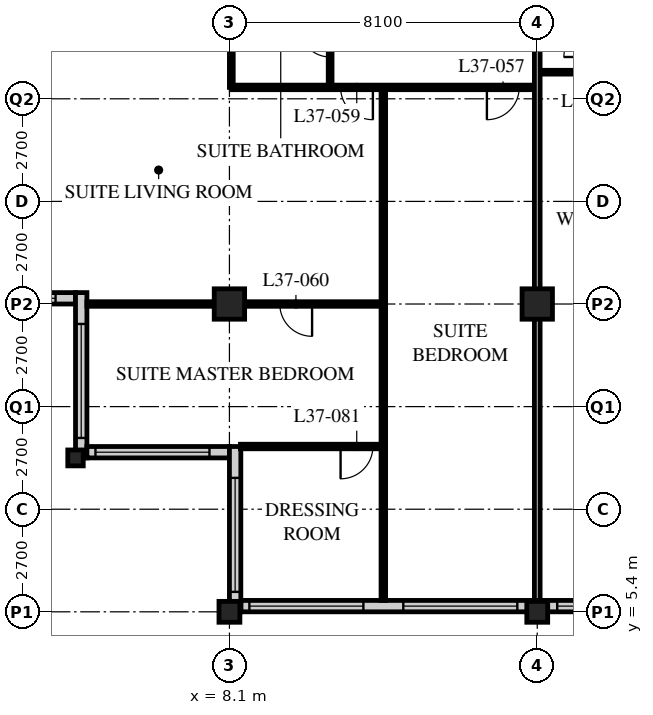
"""IFC4 building model, lengths in metres.
Left out: names, types, materials, properties, quantities, classifications, styles, units other than length and angle.
Written with IfcOpenShell. Run it as: python <this file> out.ifc"""

import sys

from ifc_helpers import new_model, si_unit, direction, frame, frame_2d, origin, origin_2d, place, context, subcontext, project, spatial, rectangle, hollow_rectangle, i_section, extrude, element, fill, save


model = new_model("IFC4")
c1 = context("Model", 3, precision=1e-05, world=origin(), true_north=direction((0.0, 1.0)))
c2 = subcontext(c1, "Body", "Model", "MODEL_VIEW")
j1 = project(units=[si_unit("LENGTHUNIT", "METRE"), si_unit("PLANEANGLEUNIT", "RADIAN")], contexts=[c1])
p1 = place(None, origin())
s1 = spatial("IfcSite", under=j1, at=p1, CompositionType="ELEMENT")
p2 = place(p1, origin())
s2 = spatial("IfcBuilding", under=s1, at=p2, CompositionType="ELEMENT")
p3 = place(p2, frame((0.0, 0.0, 144.2)))
s3 = spatial("IfcBuildingStorey", under=s2, at=p3, CompositionType="ELEMENT", Elevation=144.2)
p4 = place(p3, frame((4.05, 9.45, 0.0), z_axis=(0.0, 0.0, 1.0), x_axis=(1.0, 0.0, 0.0)))
e1 = element("IfcColumn", 1, at=p4, inside=s3, PredefinedType="COLUMN", context=c2, shape_type="SweptSolid", body=[
    extrude(i_section(OverallWidth=0.407, OverallDepth=0.419, WebThickness=0.031, FlangeThickness=0.049, FilletRadius=0.015, at=origin_2d()), origin(), (0.0, 0.0, 1.0), 3.4),
])
p5 = place(p3, frame((8.1, 5.4, 0.0), z_axis=(0.0, 0.0, 1.0), x_axis=(1.0, 0.0, 0.0)))
e2 = element("IfcColumn", 2, at=p5, inside=s3, PredefinedType="COLUMN", context=c2, shape_type="SweptSolid", body=[
    extrude(hollow_rectangle(XDim=0.55, YDim=0.55, WallThickness=0.04, at=origin_2d()), origin(), (0.0, 0.0, 1.0), 3.4),
])
p6 = place(p3, frame((8.1, 13.5, 0.0), z_axis=(0.0, 0.0, 1.0), x_axis=(1.0, 0.0, 0.0)))
e3 = element("IfcColumn", 3, at=p6, inside=s3, PredefinedType="COLUMN", context=c2, shape_type="SweptSolid", body=[
    extrude(hollow_rectangle(XDim=0.8, YDim=0.8, WallThickness=0.08, at=origin_2d()), origin(), (0.0, 0.0, 1.0), 3.4),
])
p7 = place(p3, frame((16.2, 5.4, 0.0), z_axis=(0.0, 0.0, 1.0), x_axis=(1.0, 0.0, 0.0)))
e4 = element("IfcColumn", 4, at=p7, inside=s3, PredefinedType="COLUMN", context=c2, shape_type="SweptSolid", body=[
    extrude(hollow_rectangle(XDim=0.55, YDim=0.55, WallThickness=0.04, at=origin_2d()), origin(), (0.0, 0.0, 1.0), 3.4),
])
p8 = place(p3, frame((16.2, 13.5, 0.0), z_axis=(0.0, 0.0, 1.0), x_axis=(1.0, 0.0, 0.0)))
e5 = element("IfcColumn", 5, at=p8, inside=s3, PredefinedType="COLUMN", context=c2, shape_type="SweptSolid", body=[
    extrude(hollow_rectangle(XDim=0.8, YDim=0.8, WallThickness=0.08, at=origin_2d()), origin(), (0.0, 0.0, 1.0), 3.4),
])
p9 = place(p3, frame((8.4, 5.55, 0.0), z_axis=(0.0, 0.0, 1.0), x_axis=(1.0, 0.0, 0.0)))
e6 = element("IfcWall", 6, at=p9, inside=s3, PredefinedType="SOLIDWALL", context=c2, shape_type="SweptSolid", body=[
    extrude(rectangle(XDim=40.2, YDim=0.3, at=frame_2d((20.1, 0.0))), origin(), (0.0, 0.0, 1.0), 3.19),
])
p10 = place(p9, frame((0.225, 0.0, 0.9)))
e7 = element("IfcOpeningElement", 7, at=p10, cuts=e6, PredefinedType="OPENING", context=c2, shape_type="SweptSolid", body=[
    extrude(rectangle(XDim=3.0, YDim=1.4, at=frame_2d((1.5, 0.7))), frame((0.0, 0.16, 0.0), z_axis=(0.0, -1.0, 0.0), x_axis=(1.0, 0.0, 0.0)), (0.0, 0.0, 1.0), 0.32),
])
p11 = place(p9, frame((4.275, 0.0, 0.9)))
e8 = element("IfcOpeningElement", 8, at=p11, cuts=e6, PredefinedType="OPENING", context=c2, shape_type="SweptSolid", body=[
    extrude(rectangle(XDim=3.0, YDim=1.4, at=frame_2d((1.5, 0.7))), frame((0.0, 0.16, 0.0), z_axis=(0.0, -1.0, 0.0), x_axis=(1.0, 0.0, 0.0)), (0.0, 0.0, 1.0), 0.32),
])
p12 = place(p9, frame((8.325, 0.0, 0.9)))
e9 = element("IfcOpeningElement", 9, at=p12, cuts=e6, PredefinedType="OPENING", context=c2, shape_type="SweptSolid", body=[
    extrude(rectangle(XDim=3.0, YDim=1.4, at=frame_2d((1.5, 0.7))), frame((0.0, 0.16, 0.0), z_axis=(0.0, -1.0, 0.0), x_axis=(1.0, 0.0, 0.0)), (0.0, 0.0, 1.0), 0.32),
])
p13 = place(p9, frame((12.375, 0.0, 0.9)))
e10 = element("IfcOpeningElement", 10, at=p13, cuts=e6, PredefinedType="OPENING", context=c2, shape_type="SweptSolid", body=[
    extrude(rectangle(XDim=3.0, YDim=1.4, at=frame_2d((1.5, 0.7))), frame((0.0, 0.16, 0.0), z_axis=(0.0, -1.0, 0.0), x_axis=(1.0, 0.0, 0.0)), (0.0, 0.0, 1.0), 0.32),
])
p14 = place(p9, frame((16.425, 0.0, 0.9)))
e11 = element("IfcOpeningElement", 11, at=p14, cuts=e6, PredefinedType="OPENING", context=c2, shape_type="SweptSolid", body=[
    extrude(rectangle(XDim=3.0, YDim=1.4, at=frame_2d((1.5, 0.7))), frame((0.0, 0.16, 0.0), z_axis=(0.0, -1.0, 0.0), x_axis=(1.0, 0.0, 0.0)), (0.0, 0.0, 1.0), 0.32),
])
p15 = place(p9, frame((20.475, 0.0, 0.9)))
e12 = element("IfcOpeningElement", 12, at=p15, cuts=e6, PredefinedType="OPENING", context=c2, shape_type="SweptSolid", body=[
    extrude(rectangle(XDim=3.0, YDim=1.4, at=frame_2d((1.5, 0.7))), frame((0.0, 0.16, 0.0), z_axis=(0.0, -1.0, 0.0), x_axis=(1.0, 0.0, 0.0)), (0.0, 0.0, 1.0), 0.32),
])
p16 = place(p9, frame((24.525, 0.0, 0.9)))
e13 = element("IfcOpeningElement", 13, at=p16, cuts=e6, PredefinedType="OPENING", context=c2, shape_type="SweptSolid", body=[
    extrude(rectangle(XDim=3.0, YDim=1.4, at=frame_2d((1.5, 0.7))), frame((0.0, 0.16, 0.0), z_axis=(0.0, -1.0, 0.0), x_axis=(1.0, 0.0, 0.0)), (0.0, 0.0, 1.0), 0.32),
])
p17 = place(p9, frame((28.575, 0.0, 0.9)))
e14 = element("IfcOpeningElement", 14, at=p17, cuts=e6, PredefinedType="OPENING", context=c2, shape_type="SweptSolid", body=[
    extrude(rectangle(XDim=3.0, YDim=1.4, at=frame_2d((1.5, 0.7))), frame((0.0, 0.16, 0.0), z_axis=(0.0, -1.0, 0.0), x_axis=(1.0, 0.0, 0.0)), (0.0, 0.0, 1.0), 0.32),
])
p18 = place(p9, frame((32.625, 0.0, 0.9)))
e15 = element("IfcOpeningElement", 15, at=p18, cuts=e6, PredefinedType="OPENING", context=c2, shape_type="SweptSolid", body=[
    extrude(rectangle(XDim=3.0, YDim=1.4, at=frame_2d((1.5, 0.7))), frame((0.0, 0.16, 0.0), z_axis=(0.0, -1.0, 0.0), x_axis=(1.0, 0.0, 0.0)), (0.0, 0.0, 1.0), 0.32),
])
p19 = place(p9, frame((36.675, 0.0, 0.9)))
e16 = element("IfcOpeningElement", 16, at=p19, cuts=e6, PredefinedType="OPENING", context=c2, shape_type="SweptSolid", body=[
    extrude(rectangle(XDim=3.0, YDim=1.4, at=frame_2d((1.5, 0.7))), frame((0.0, 0.16, 0.0), z_axis=(0.0, -1.0, 0.0), x_axis=(1.0, 0.0, 0.0)), (0.0, 0.0, 1.0), 0.32),
])
p20 = place(p3, frame((0.3, 13.65, 0.0), z_axis=(0.0, 0.0, 1.0), x_axis=(1.0, 0.0, 0.0)))
e17 = element("IfcWall", 17, at=p20, inside=s3, PredefinedType="SOLIDWALL", context=c2, shape_type="SweptSolid", body=[
    extrude(rectangle(XDim=3.75, YDim=0.3, at=frame_2d((1.875, 0.0))), origin(), (0.0, 0.0, 1.0), 3.19),
])
p21 = place(p20, frame((0.225, 0.0, 0.9)))
e18 = element("IfcOpeningElement", 18, at=p21, cuts=e17, PredefinedType="OPENING", context=c2, shape_type="SweptSolid", body=[
    extrude(rectangle(XDim=3.0, YDim=1.4, at=frame_2d((1.5, 0.7))), frame((0.0, 0.16, 0.0), z_axis=(0.0, -1.0, 0.0), x_axis=(1.0, 0.0, 0.0)), (0.0, 0.0, 1.0), 0.32),
])
p22 = place(p3, frame((4.2, 13.8, 0.0), z_axis=(0.0, 0.0, 1.0), x_axis=(0.0, -1.0, 0.0)))
e19 = element("IfcWall", 19, at=p22, inside=s3, PredefinedType="SOLIDWALL", context=c2, shape_type="SweptSolid", body=[
    extrude(rectangle(XDim=4.35, YDim=0.3, at=frame_2d((2.175, 0.0))), origin(), (0.0, 0.0, 1.0), 3.19),
])
p23 = place(p22, frame((0.825, 0.0, 0.9)))
e20 = element("IfcOpeningElement", 20, at=p23, cuts=e19, PredefinedType="OPENING", context=c2, shape_type="SweptSolid", body=[
    extrude(rectangle(XDim=3.0, YDim=1.4, at=frame_2d((1.5, 0.7))), frame((0.0, 0.16, 0.0), z_axis=(0.0, -1.0, 0.0), x_axis=(1.0, 0.0, 0.0)), (0.0, 0.0, 1.0), 0.32),
])
p24 = place(p3, frame((4.35, 9.6, 0.0), z_axis=(0.0, 0.0, 1.0), x_axis=(1.0, 0.0, 0.0)))
e21 = element("IfcWall", 21, at=p24, inside=s3, PredefinedType="SOLIDWALL", context=c2, shape_type="SweptSolid", body=[
    extrude(rectangle(XDim=3.75, YDim=0.3, at=frame_2d((1.875, 0.0))), origin(), (0.0, 0.0, 1.0), 3.19),
])
p25 = place(p24, frame((0.225, 0.0, 0.9)))
e22 = element("IfcOpeningElement", 22, at=p25, cuts=e21, PredefinedType="OPENING", context=c2, shape_type="SweptSolid", body=[
    extrude(rectangle(XDim=3.0, YDim=1.4, at=frame_2d((1.5, 0.7))), frame((0.0, 0.16, 0.0), z_axis=(0.0, -1.0, 0.0), x_axis=(1.0, 0.0, 0.0)), (0.0, 0.0, 1.0), 0.32),
])
p26 = place(p3, frame((8.25, 9.75, 0.0), z_axis=(0.0, 0.0, 1.0), x_axis=(0.0, -1.0, 0.0)))
e23 = element("IfcWall", 23, at=p26, inside=s3, PredefinedType="SOLIDWALL", context=c2, shape_type="SweptSolid", body=[
    extrude(rectangle(XDim=4.35, YDim=0.3, at=frame_2d((2.175, 0.0))), origin(), (0.0, 0.0, 1.0), 3.19),
])
p27 = place(p26, frame((0.825, 0.0, 0.9)))
e24 = element("IfcOpeningElement", 24, at=p27, cuts=e23, PredefinedType="OPENING", context=c2, shape_type="SweptSolid", body=[
    extrude(rectangle(XDim=3.0, YDim=1.4, at=frame_2d((1.5, 0.7))), frame((0.0, 0.16, 0.0), z_axis=(0.0, -1.0, 0.0), x_axis=(1.0, 0.0, 0.0)), (0.0, 0.0, 1.0), 0.32),
])
p28 = place(p3, frame((16.2, 19.6, 0.0), z_axis=(0.0, 0.0, 1.0), x_axis=(1.0, 0.0, 0.0)))
e25 = element("IfcWall", 25, at=p28, inside=s3, PredefinedType="PARTITIONING", context=c2, shape_type="SweptSolid", body=[
    extrude(rectangle(XDim=1.5, YDim=0.1, at=frame_2d((0.75, 0.0))), origin(), (0.0, 0.0, 1.0), 3.19),
])
p29 = place(p3, frame((10.75, 21.6, 0.0), z_axis=(0.0, 0.0, 1.0), x_axis=(0.0, -1.0, 0.0)))
e26 = element("IfcWall", 26, at=p29, inside=s3, PredefinedType="PARTITIONING", context=c2, shape_type="SweptSolid", body=[
    extrude(rectangle(XDim=2.4, YDim=0.1, at=frame_2d((1.2, 0.0))), origin(), (0.0, 0.0, 1.0), 3.19),
])
p30 = place(p29, frame((0.8, 0.0, 0.0)))
e27 = element("IfcOpeningElement", 27, at=p30, cuts=e26, PredefinedType="OPENING", context=c2, shape_type="SweptSolid", body=[
    extrude(rectangle(XDim=0.8, YDim=2.1, at=frame_2d((0.4, 1.05))), frame((0.0, 0.06, 0.0), z_axis=(0.0, -1.0, 0.0), x_axis=(1.0, 0.0, 0.0)), (0.0, 0.0, 1.0), 0.12),
])
p31 = place(p3, frame((8.15, 21.6, 0.0), z_axis=(0.0, 0.0, 1.0), x_axis=(0.0, -1.0, 0.0)))
e28 = element("IfcWall", 28, at=p31, inside=s3, PredefinedType="PARTITIONING", context=c2, shape_type="SweptSolid", body=[
    extrude(rectangle(XDim=2.4, YDim=0.1, at=frame_2d((1.2, 0.0))), origin(), (0.0, 0.0, 1.0), 2.42),
])
p32 = place(p3, frame((8.15, 19.2, 0.0), z_axis=(0.0, 0.0, 1.0), x_axis=(1.0, 0.0, 0.0)))
e29 = element("IfcWall", 29, at=p32, inside=s3, PredefinedType="PARTITIONING", context=c2, shape_type="SweptSolid", body=[
    extrude(rectangle(XDim=8.05, YDim=0.12, at=frame_2d((4.025, 0.0))), origin(), (0.0, 0.0, 1.0), 3.19),
])
p33 = place(p32, frame((6.725, 0.0, 0.0)))
e30 = element("IfcOpeningElement", 30, at=p33, cuts=e29, PredefinedType="OPENING", context=c2, shape_type="SweptSolid", body=[
    extrude(rectangle(XDim=0.85, YDim=2.1, at=frame_2d((0.425, 1.05))), frame((0.0, 0.07, 0.0), z_axis=(0.0, -1.0, 0.0), x_axis=(1.0, 0.0, 0.0)), (0.0, 0.0, 1.0), 0.14),
])
p34 = place(p32, frame((2.875, 0.0, 0.0)))
e31 = element("IfcOpeningElement", 31, at=p34, cuts=e29, PredefinedType="OPENING", context=c2, shape_type="SweptSolid", body=[
    extrude(rectangle(XDim=0.85, YDim=2.1, at=frame_2d((0.425, 1.05))), frame((0.0, 0.07, 0.0), z_axis=(0.0, -1.0, 0.0), x_axis=(1.0, 0.0, 0.0)), (0.0, 0.0, 1.0), 0.14),
])
p35 = place(p3, frame((12.15, 19.2, 0.0), z_axis=(0.0, 0.0, 1.0), x_axis=(0.0, -1.0, 0.0)))
e32 = element("IfcWall", 32, at=p35, inside=s3, PredefinedType="PARTITIONING", context=c2, shape_type="SweptSolid", body=[
    extrude(rectangle(XDim=13.5, YDim=0.12, at=frame_2d((6.75, 0.0))), origin(), (0.0, 0.0, 1.0), 3.19),
])
p36 = place(p3, frame((12.15, 13.5, 0.0), z_axis=(0.0, 0.0, 1.0), x_axis=(-1.0, 0.0, 0.0)))
e33 = element("IfcWall", 33, at=p36, inside=s3, PredefinedType="PARTITIONING", context=c2, shape_type="SweptSolid", body=[
    extrude(rectangle(XDim=7.8, YDim=0.12, at=frame_2d((3.9, 0.0))), origin(), (0.0, 0.0, 1.0), 2.42),
])
p37 = place(p36, frame((1.875, 0.0, 0.0)))
e34 = element("IfcOpeningElement", 34, at=p37, cuts=e33, PredefinedType="OPENING", context=c2, shape_type="SweptSolid", body=[
    extrude(rectangle(XDim=0.85, YDim=2.1, at=frame_2d((0.425, 1.05))), frame((0.0, 0.07, 0.0), z_axis=(0.0, -1.0, 0.0), x_axis=(1.0, 0.0, 0.0)), (0.0, 0.0, 1.0), 0.14),
])
p38 = place(p3, frame((16.2, 21.6, 0.0), z_axis=(0.0, 0.0, 1.0), x_axis=(0.0, -1.0, 0.0)))
e35 = element("IfcWall", 35, at=p38, inside=s3, PredefinedType="PARTITIONING", context=c2, shape_type="SweptSolid", body=[
    extrude(rectangle(XDim=15.9, YDim=0.15, at=frame_2d((7.95, 0.0))), origin(), (0.0, 0.0, 1.0), 2.42),
])
p39 = place(p3, frame((8.39, 9.75, 0.0), z_axis=(0.0, 0.0, 1.0), x_axis=(1.0, 0.0, 0.0)))
e36 = element("IfcWall", 36, at=p39, inside=s3, PredefinedType="PARTITIONING", context=c2, shape_type="SweptSolid", body=[
    extrude(rectangle(XDim=3.76, YDim=0.12, at=frame_2d((1.88, 0.0))), origin(), (0.0, 0.0, 1.0), 3.19),
])
p40 = place(p39, frame((2.635, 0.0, 0.0)))
e37 = element("IfcOpeningElement", 37, at=p40, cuts=e36, PredefinedType="OPENING", context=c2, shape_type="SweptSolid", body=[
    extrude(rectangle(XDim=0.85, YDim=2.1, at=frame_2d((0.425, 1.05))), frame((0.0, 0.07, 0.0), z_axis=(0.0, -1.0, 0.0), x_axis=(1.0, 0.0, 0.0)), (0.0, 0.0, 1.0), 0.14),
])
p41 = place(p10, origin())
e38 = element("IfcWindow", 38, at=p41, inside=s3, PartitioningType="SINGLE_PANEL", PredefinedType="WINDOW", context=c2, shape_type="SweptSolid", body=[
    extrude(rectangle(XDim=3.0, YDim=1.4, at=frame_2d((1.5, 0.7))), frame((0.0, 0.03, 0.0), z_axis=(0.0, -1.0, 0.0), x_axis=(1.0, 0.0, 0.0)), (0.0, 0.0, 1.0), 0.06),
])
fill(e7, e38)
p42 = place(p11, origin())
e39 = element("IfcWindow", 39, at=p42, inside=s3, PartitioningType="SINGLE_PANEL", PredefinedType="WINDOW", context=c2, shape_type="SweptSolid", body=[
    extrude(rectangle(XDim=3.0, YDim=1.4, at=frame_2d((1.5, 0.7))), frame((0.0, 0.03, 0.0), z_axis=(0.0, -1.0, 0.0), x_axis=(1.0, 0.0, 0.0)), (0.0, 0.0, 1.0), 0.06),
])
fill(e8, e39)
p43 = place(p12, origin())
e40 = element("IfcWindow", 40, at=p43, inside=s3, PartitioningType="SINGLE_PANEL", PredefinedType="WINDOW", context=c2, shape_type="SweptSolid", body=[
    extrude(rectangle(XDim=3.0, YDim=1.4, at=frame_2d((1.5, 0.7))), frame((0.0, 0.03, 0.0), z_axis=(0.0, -1.0, 0.0), x_axis=(1.0, 0.0, 0.0)), (0.0, 0.0, 1.0), 0.06),
])
fill(e9, e40)
p44 = place(p21, origin())
e41 = element("IfcWindow", 41, at=p44, inside=s3, PartitioningType="SINGLE_PANEL", PredefinedType="WINDOW", context=c2, shape_type="SweptSolid", body=[
    extrude(rectangle(XDim=3.0, YDim=1.4, at=frame_2d((1.5, 0.7))), frame((0.0, 0.03, 0.0), z_axis=(0.0, -1.0, 0.0), x_axis=(1.0, 0.0, 0.0)), (0.0, 0.0, 1.0), 0.06),
])
fill(e18, e41)
p45 = place(p23, origin())
e42 = element("IfcWindow", 42, at=p45, inside=s3, PartitioningType="SINGLE_PANEL", PredefinedType="WINDOW", context=c2, shape_type="SweptSolid", body=[
    extrude(rectangle(XDim=3.0, YDim=1.4, at=frame_2d((1.5, 0.7))), frame((0.0, 0.03, 0.0), z_axis=(0.0, -1.0, 0.0), x_axis=(1.0, 0.0, 0.0)), (0.0, 0.0, 1.0), 0.06),
])
fill(e20, e42)
p46 = place(p25, origin())
e43 = element("IfcWindow", 43, at=p46, inside=s3, PartitioningType="SINGLE_PANEL", PredefinedType="WINDOW", context=c2, shape_type="SweptSolid", body=[
    extrude(rectangle(XDim=3.0, YDim=1.4, at=frame_2d((1.5, 0.7))), frame((0.0, 0.03, 0.0), z_axis=(0.0, -1.0, 0.0), x_axis=(1.0, 0.0, 0.0)), (0.0, 0.0, 1.0), 0.06),
])
fill(e22, e43)
p47 = place(p27, origin())
e44 = element("IfcWindow", 44, at=p47, inside=s3, PartitioningType="SINGLE_PANEL", PredefinedType="WINDOW", context=c2, shape_type="SweptSolid", body=[
    extrude(rectangle(XDim=3.0, YDim=1.4, at=frame_2d((1.5, 0.7))), frame((0.0, 0.03, 0.0), z_axis=(0.0, -1.0, 0.0), x_axis=(1.0, 0.0, 0.0)), (0.0, 0.0, 1.0), 0.06),
])
fill(e24, e44)
p48 = place(p33, origin())
e45 = element("IfcDoor", 45, at=p48, inside=s3, OperationType="SINGLE_SWING_RIGHT", PredefinedType="DOOR", context=c2, shape_type="SweptSolid", body=[
    extrude(rectangle(XDim=0.85, YDim=2.1, at=frame_2d((0.425, 1.05))), frame((0.0, 0.025, 0.0), z_axis=(0.0, -1.0, 0.0), x_axis=(1.0, 0.0, 0.0)), (0.0, 0.0, 1.0), 0.05),
])
fill(e30, e45)
p49 = place(p30, origin())
e46 = element("IfcDoor", 46, at=p49, inside=s3, OperationType="SINGLE_SWING_RIGHT", PredefinedType="DOOR", context=c2, shape_type="SweptSolid", body=[
    extrude(rectangle(XDim=0.8, YDim=2.1, at=frame_2d((0.4, 1.05))), frame((0.0, 0.025, 0.0), z_axis=(0.0, -1.0, 0.0), x_axis=(1.0, 0.0, 0.0)), (0.0, 0.0, 1.0), 0.05),
])
fill(e27, e46)
p50 = place(p34, origin())
e47 = element("IfcDoor", 47, at=p50, inside=s3, OperationType="SINGLE_SWING_LEFT", PredefinedType="DOOR", context=c2, shape_type="SweptSolid", body=[
    extrude(rectangle(XDim=0.85, YDim=2.1, at=frame_2d((0.425, 1.05))), frame((0.0, 0.025, 0.0), z_axis=(0.0, -1.0, 0.0), x_axis=(1.0, 0.0, 0.0)), (0.0, 0.0, 1.0), 0.05),
])
fill(e31, e47)
p51 = place(p37, origin())
e48 = element("IfcDoor", 48, at=p51, inside=s3, OperationType="SINGLE_SWING_LEFT", PredefinedType="DOOR", context=c2, shape_type="SweptSolid", body=[
    extrude(rectangle(XDim=0.85, YDim=2.1, at=frame_2d((0.425, 1.05))), frame((0.0, 0.025, 0.0), z_axis=(0.0, -1.0, 0.0), x_axis=(1.0, 0.0, 0.0)), (0.0, 0.0, 1.0), 0.05),
])
fill(e34, e48)
p52 = place(p40, origin())
e49 = element("IfcDoor", 49, at=p52, inside=s3, OperationType="SINGLE_SWING_RIGHT", PredefinedType="DOOR", context=c2, shape_type="SweptSolid", body=[
    extrude(rectangle(XDim=0.85, YDim=2.1, at=frame_2d((0.425, 1.05))), frame((0.0, 0.025, 0.0), z_axis=(0.0, -1.0, 0.0), x_axis=(1.0, 0.0, 0.0)), (0.0, 0.0, 1.0), 0.05),
])
fill(e37, e49)
save(model, sys.argv[1])
